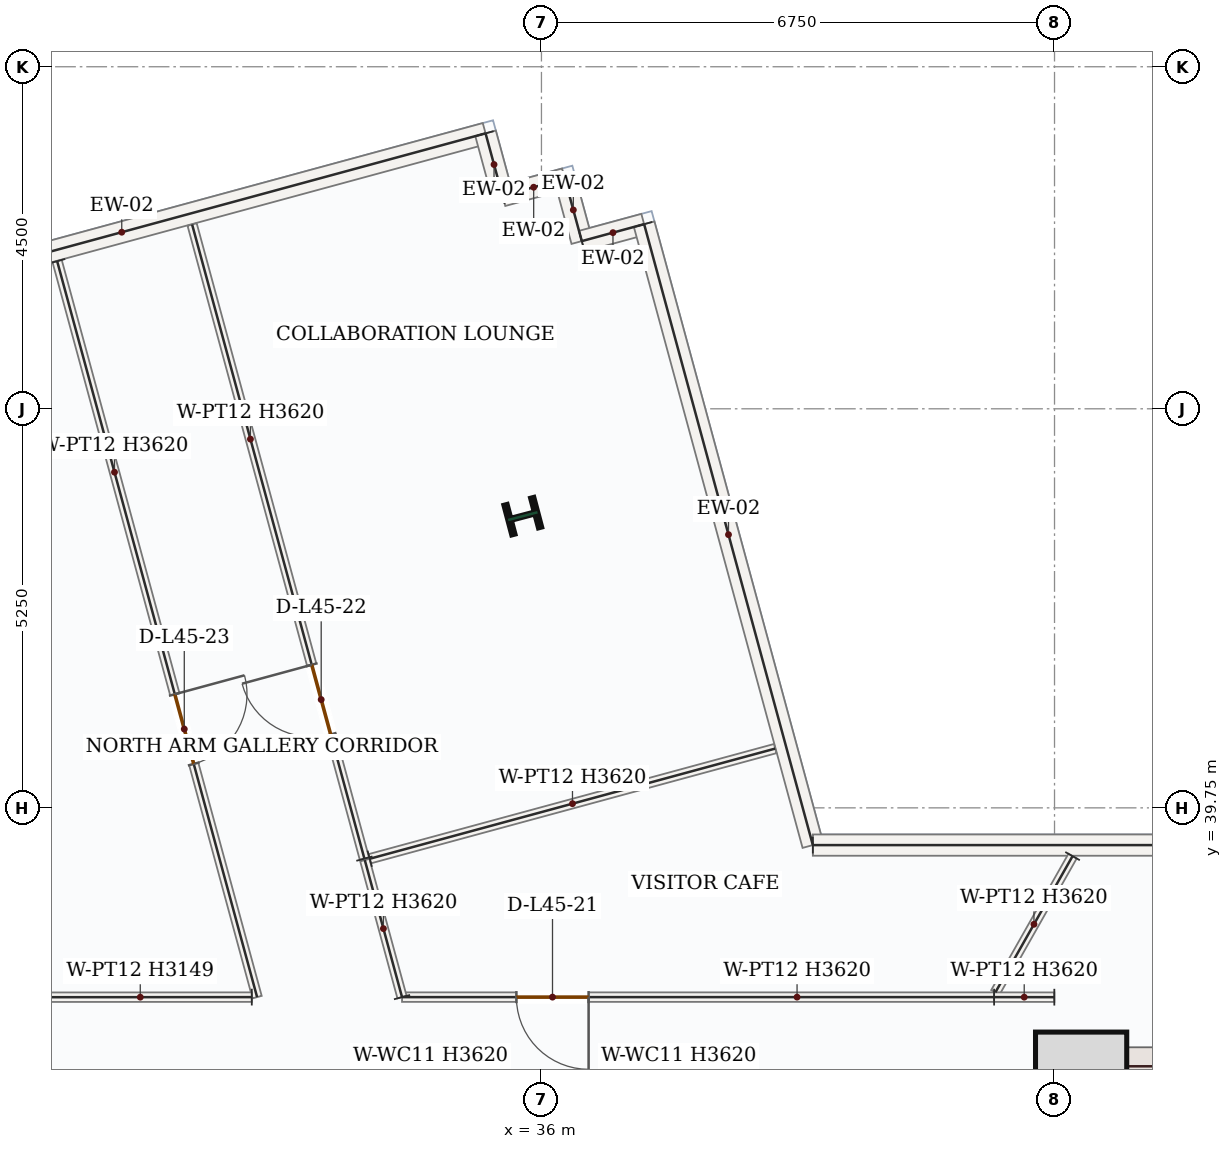
"""IFC4 building model, lengths in metres.
Left out: names, types, materials, properties, quantities, classifications, styles, units other than length and angle.
Written with IfcOpenShell. Run it as: python <this file> out.ifc"""

import sys

from ifc_helpers import new_model, si_unit, direction, frame, frame_2d, origin, origin_2d, place, context, subcontext, project, spatial, rectangle, i_section, extrude, source, transform, mapped, element, fill, save


model = new_model("IFC4")
c1 = context("Model", 3, precision=1e-05, world=origin(), true_north=direction((0.0, 1.0)))
c2 = subcontext(c1, "Body", "Model", "MODEL_VIEW")
j1 = project(units=[si_unit("LENGTHUNIT", "METRE"), si_unit("PLANEANGLEUNIT", "RADIAN")], contexts=[c1])
p1 = place(None, origin())
s1 = spatial("IfcSite", under=j1, at=p1, CompositionType="ELEMENT")
p2 = place(p1, origin())
s2 = spatial("IfcBuilding", under=s1, at=p2, CompositionType="ELEMENT")
p3 = place(p2, frame((0.0, 0.0, 194.1)))
s3 = spatial("IfcBuildingStorey", under=s2, at=p3, CompositionType="ELEMENT", Elevation=194.1)
p4 = place(p3, frame((43.0, 28.05, 0.0), z_axis=(0.0, 0.0, 1.0), x_axis=(0.0, 1.0, 0.0)))
e1 = element("IfcWall", 1, at=p4, inside=s3, PredefinedType="SHEAR", context=c2, shape_type="SweptSolid", body=[
    extrude(rectangle(XDim=8.55, YDim=0.5, at=frame_2d((4.275, 0.0))), origin(), (0.0, 0.0, 1.0), 3.62),
])
p5 = place(p4, frame((1.5, 0.0, 0.0)))
e2 = element("IfcOpeningElement", 2, at=p5, cuts=e1, PredefinedType="OPENING", context=c2, shape_type="SweptSolid", body=[
    extrude(rectangle(XDim=1.1, YDim=2.2, at=frame_2d((0.55, 1.1))), frame((0.0, 0.26, 0.0), z_axis=(0.0, -1.0, 0.0), x_axis=(1.0, 0.0, 0.0)), (0.0, 0.0, 1.0), 0.52),
])
m1 = source(origin(), c2, "Body", "SweptSolid", [
    extrude(rectangle(XDim=7.0, YDim=0.5, at=frame_2d((3.5, 0.0))), origin(), (0.0, 0.0, 1.0), 3.62),
])
p6 = place(p3, frame((43.25, 36.35, 0.0), z_axis=(0.0, 0.0, 1.0), x_axis=(1.0, 0.0, 0.0)))
e3 = element("IfcWall", 3, at=p6, inside=s3, PredefinedType="SHEAR", context=c2, shape_type="MappedRepresentation", body=[
    mapped(m1, transform((0.0, 0.0, 0.0), x_axis=(1.0, 0.0, 0.0), y_axis=(0.0, 1.0, 0.0), z_axis=(0.0, 0.0, 1.0), scale=1.0)),
])
m2 = source(origin(), c2, "Body", "SweptSolid", [
    extrude(rectangle(XDim=1.2, YDim=1.2, at=origin_2d()), origin(), (0.0, 0.0, 1.0), 3.9),
])
p7 = place(p3, frame((43.1, 36.2, 0.0), z_axis=(0.0, 0.0, 1.0), x_axis=(1.0, 0.0, 0.0)))
e4 = element("IfcColumn", 4, at=p7, inside=s3, PredefinedType="COLUMN", context=c2, shape_type="MappedRepresentation", body=[
    mapped(m2, transform((0.0, 0.0, 0.0), x_axis=(1.0, 0.0, 0.0), y_axis=(0.0, 1.0, 0.0), z_axis=(0.0, 0.0, 1.0), scale=1.0)),
])
m3 = source(origin(), c2, "Body", "SweptSolid", [
    extrude(i_section(OverallWidth=0.404, OverallDepth=0.407, WebThickness=0.027, FlangeThickness=0.044, FilletRadius=0.018, at=origin_2d()), origin(), (0.0, 0.0, 1.0), 3.9),
])
p8 = place(p3, frame((35.755, 43.588, 0.0), z_axis=(0.0, 0.0, 1.0), x_axis=(-0.255445757936, 0.966823388604, 0.0)))
e5 = element("IfcColumn", 5, at=p8, inside=s3, PredefinedType="COLUMN", context=c2, shape_type="MappedRepresentation", body=[
    mapped(m3, transform((0.0, 0.0, 0.0), x_axis=(1.0, 0.0, 0.0), y_axis=(0.0, 1.0, 0.0), z_axis=(0.0, 0.0, 1.0), scale=1.0)),
])
m4 = source(origin(), c2, "Body", "SweptSolid", [
    extrude(rectangle(XDim=9.92, YDim=0.28, at=frame_2d((4.96, 0.0))), origin(), (0.0, 0.0, 1.0), 3.62),
])
p9 = place(p3, frame((25.692, 46.023, 0.0), z_axis=(0.0, 0.0, 1.0), x_axis=(0.965012714082, 0.262203092393, 0.0)))
e6 = element("IfcWall", 6, at=p9, inside=s3, PredefinedType="SOLIDWALL", context=c2, shape_type="MappedRepresentation", body=[
    mapped(m4, transform((0.0, 0.0, 0.0), x_axis=(1.0, 0.0, 0.0), y_axis=(0.0, 1.0, 0.0), z_axis=(0.0, 0.0, 1.0), scale=1.0)),
])
m5 = source(origin(), c2, "Body", "SweptSolid", [
    extrude(rectangle(XDim=0.85, YDim=0.28, at=frame_2d((0.425, 0.0))), origin(), (0.0, 0.0, 1.0), 3.62),
])
for number, where, z_axis, x_axis in (
    (7, (35.265, 48.624, 0.0), (0.0, 0.0, 1.0), (0.262, -0.965, 0.0)),
    (8, (35.488, 47.803, 0.0), (0.0, 0.0, 1.0), (0.965, 0.262, 0.0)),
    (9, (36.308, 48.026, 0.0), (0.0, 0.0, 1.0), (0.262, -0.965, 0.0)),
    (10, (36.531, 47.206, 0.0), (0.0, 0.0, 1.0), (0.965, 0.262, 0.0)),
):
    element("IfcWall", number, at=place(p3, frame(where, z_axis=z_axis, x_axis=x_axis)), inside=s3, PredefinedType="SOLIDWALL", context=c2, shape_type="MappedRepresentation", body=[
        mapped(m5, transform((0.0, 0.0, 0.0), x_axis=(1.0, 0.0, 0.0), y_axis=(0.0, 1.0, 0.0), z_axis=(0.0, 0.0, 1.0), scale=1.0)),
    ])
m6 = source(origin(), c2, "Body", "SweptSolid", [
    extrude(rectangle(XDim=8.465, YDim=0.28, at=frame_2d((4.232, 0.0))), origin(), (0.0, 0.0, 1.0), 3.62),
])
p10 = place(p3, frame((37.351, 47.429, 0.0), z_axis=(0.0, 0.0, 1.0), x_axis=(0.262192380254, -0.965015624608, 0.0)))
e11 = element("IfcWall", 11, at=p10, inside=s3, PredefinedType="SOLIDWALL", context=c2, shape_type="MappedRepresentation", body=[
    mapped(m6, transform((0.0, 0.0, 0.0), x_axis=(1.0, 0.0, 0.0), y_axis=(0.0, 1.0, 0.0), z_axis=(0.0, 0.0, 1.0), scale=1.0)),
])
m7 = source(origin(), c2, "Body", "SweptSolid", [
    extrude(rectangle(XDim=9.771, YDim=0.28, at=frame_2d((4.886, 0.0))), origin(), (0.0, 0.0, 1.0), 3.62),
])
p11 = place(p3, frame((39.571, 39.26, 0.0), z_axis=(0.0, 0.0, 1.0), x_axis=(1.0, 0.0, 0.0)))
e12 = element("IfcWall", 12, at=p11, inside=s3, PredefinedType="SOLIDWALL", context=c2, shape_type="MappedRepresentation", body=[
    mapped(m7, transform((0.0, 0.0, 0.0), x_axis=(1.0, 0.0, 0.0), y_axis=(0.0, 1.0, 0.0), z_axis=(0.0, 0.0, 1.0), scale=1.0)),
])
p12 = place(p3, frame((41.955, 37.26, 0.0), z_axis=(0.0, 0.0, 1.0), x_axis=(-1.0, 0.0, 0.0)))
e13 = element("IfcWall", 13, at=p12, inside=s3, PredefinedType="PARTITIONING", context=c2, shape_type="SweptSolid", body=[
    extrude(rectangle(XDim=7.79, YDim=0.125, at=frame_2d((3.895, 0.0))), origin(), (0.0, 0.0, 1.0), 3.62),
])
p13 = place(p12, frame((5.335, 0.0, 0.0)))
e14 = element("IfcOpeningElement", 14, at=p13, cuts=e13, PredefinedType="OPENING", context=c2, shape_type="SweptSolid", body=[
    extrude(rectangle(XDim=0.95, YDim=2.15, at=frame_2d((0.475, 1.075))), frame((0.0, 0.073, 0.0), z_axis=(0.0, -1.0, 0.0), x_axis=(1.0, 0.0, 0.0)), (0.0, 0.0, 1.0), 0.145),
])
m8 = source(origin(), c2, "Body", "SweptSolid", [
    extrude(rectangle(XDim=1.868, YDim=0.125, at=frame_2d((0.934, 0.0))), origin(), (0.0, 0.0, 1.0), 3.62),
])
p14 = place(p3, frame((34.166, 37.26, 0.0), z_axis=(0.0, 0.0, 1.0), x_axis=(-0.262166249224, 0.965022723964, 0.0)))
e15 = element("IfcWall", 15, at=p14, inside=s3, PredefinedType="PARTITIONING", context=c2, shape_type="MappedRepresentation", body=[
    mapped(m8, transform((0.0, 0.0, 0.0), x_axis=(1.0, 0.0, 0.0), y_axis=(0.0, 1.0, 0.0), z_axis=(0.0, 0.0, 1.0), scale=1.0)),
])
m9 = source(origin(), c2, "Body", "SweptSolid", [
    extrude(rectangle(XDim=5.527, YDim=0.125, at=frame_2d((2.764, 0.0))), origin(), (0.0, 0.0, 1.0), 3.62),
])
p15 = place(p3, frame((33.741, 39.08, 0.0), z_axis=(0.0, 0.0, 1.0), x_axis=(0.965004985248, 0.262231535949, 0.0)))
e16 = element("IfcWall", 16, at=p15, inside=s3, PredefinedType="PARTITIONING", context=c2, shape_type="MappedRepresentation", body=[
    mapped(m9, transform((0.0, 0.0, 0.0), x_axis=(1.0, 0.0, 0.0), y_axis=(0.0, 1.0, 0.0), z_axis=(0.0, 0.0, 1.0), scale=1.0)),
])
m10 = source(origin(), c2, "Body", "SweptSolid", [
    extrude(rectangle(XDim=2.061, YDim=0.125, at=frame_2d((1.03, 0.0))), origin(), (0.0, 0.0, 1.0), 3.62),
])
p16 = place(p3, frame((42.987, 39.115, 0.0), z_axis=(0.0, 0.0, 1.0), x_axis=(-0.492818271576, -0.870132260752, 0.0)))
e17 = element("IfcWall", 17, at=p16, inside=s3, PredefinedType="PARTITIONING", context=c2, shape_type="MappedRepresentation", body=[
    mapped(m10, transform((0.0, 0.0, 0.0), x_axis=(1.0, 0.0, 0.0), y_axis=(0.0, 1.0, 0.0), z_axis=(0.0, 0.0, 1.0), scale=1.0)),
])
p17 = place(p3, frame((33.671, 39.082, 0.0), z_axis=(0.0, 0.0, 1.0), x_axis=(-0.262187726373, 0.965016889044, 0.0)))
e18 = element("IfcWall", 18, at=p17, inside=s3, PredefinedType="PARTITIONING", context=c2, shape_type="SweptSolid", body=[
    extrude(rectangle(XDim=8.645, YDim=0.125, at=frame_2d((4.323, 0.0))), origin(), (0.0, 0.0, 1.0), 3.62),
])
p18 = place(p17, frame((1.693, 0.0, 0.0)))
e19 = element("IfcOpeningElement", 19, at=p18, cuts=e18, PredefinedType="OPENING", context=c2, shape_type="SweptSolid", body=[
    extrude(rectangle(XDim=0.95, YDim=2.15, at=frame_2d((0.475, 1.075))), frame((0.0, 0.073, 0.0), z_axis=(0.0, -1.0, 0.0), x_axis=(1.0, 0.0, 0.0)), (0.0, 0.0, 1.0), 0.145),
])
p19 = place(p3, frame((29.628, 46.942, 0.0), z_axis=(0.0, 0.0, 1.0), x_axis=(0.262192801501, -0.965015510156, 0.0)))
e20 = element("IfcWall", 20, at=p19, inside=s3, PredefinedType="PARTITIONING", context=c2, shape_type="SweptSolid", body=[
    extrude(rectangle(XDim=10.033, YDim=0.125, at=frame_2d((5.017, 0.0))), origin(), (0.0, 0.0, 1.0), 3.62),
])
p20 = place(p19, frame((5.904, 0.0, 0.0)))
e21 = element("IfcOpeningElement", 21, at=p20, cuts=e20, PredefinedType="OPENING", context=c2, shape_type="SweptSolid", body=[
    extrude(rectangle(XDim=0.95, YDim=2.15, at=frame_2d((0.475, 1.075))), frame((0.0, 0.073, 0.0), z_axis=(0.0, -1.0, 0.0), x_axis=(1.0, 0.0, 0.0)), (0.0, 0.0, 1.0), 0.145),
])
m11 = source(origin(), c2, "Body", "SweptSolid", [
    extrude(rectangle(XDim=2.934, YDim=0.125, at=frame_2d((1.467, 0.0))), origin(), (0.0, 0.0, 1.0), 3.149),
])
p21 = place(p3, frame((32.189, 37.26, 0.0), z_axis=(0.0, 0.0, 1.0), x_axis=(-0.999999913469, -0.000416007951, 0.0)))
e22 = element("IfcWall", 22, at=p21, inside=s3, PredefinedType="PARTITIONING", context=c2, shape_type="MappedRepresentation", body=[
    mapped(m11, transform((0.0, 0.0, 0.0), x_axis=(1.0, 0.0, 0.0), y_axis=(0.0, 1.0, 0.0), z_axis=(0.0, 0.0, 1.0), scale=1.0)),
])
m12 = source(origin(), c2, "Body", "SweptSolid", [
    extrude(rectangle(XDim=0.792, YDim=0.125, at=frame_2d((0.396, 0.0))), origin(), (0.0, 0.0, 1.0), 3.62),
])
p22 = place(p3, frame((42.748, 37.259, 0.0), z_axis=(0.0, 0.0, 1.0), x_axis=(-0.999999572651, 0.000924498835, 0.0)))
e23 = element("IfcWall", 23, at=p22, inside=s3, PredefinedType="PARTITIONING", context=c2, shape_type="MappedRepresentation", body=[
    mapped(m12, transform((0.0, 0.0, 0.0), x_axis=(1.0, 0.0, 0.0), y_axis=(0.0, 1.0, 0.0), z_axis=(0.0, 0.0, 1.0), scale=1.0)),
])
m13 = source(origin(), c2, "Body", "SweptSolid", [
    extrude(rectangle(XDim=0.95, YDim=2.15, at=frame_2d((0.475, 1.075))), frame((0.0, 0.025, 0.0), z_axis=(0.0, -1.0, 0.0), x_axis=(1.0, 0.0, 0.0)), (0.0, 0.0, 1.0), 0.05),
])
p23 = place(p13, origin())
e24 = element("IfcDoor", 24, at=p23, inside=s3, OperationType="SINGLE_SWING_LEFT", PredefinedType="DOOR", context=c2, shape_type="MappedRepresentation", body=[
    mapped(m13, transform((0.0, 0.0, 0.0), x_axis=(1.0, 0.0, 0.0), y_axis=(0.0, 1.0, 0.0), z_axis=(0.0, 0.0, 1.0), scale=1.0)),
])
fill(e14, e24)
p24 = place(p18, origin())
e25 = element("IfcDoor", 25, at=p24, inside=s3, OperationType="SINGLE_SWING_RIGHT", PredefinedType="DOOR", context=c2, shape_type="MappedRepresentation", body=[
    mapped(m13, transform((0.0, 0.0, 0.0), x_axis=(1.0, 0.0, 0.0), y_axis=(0.0, 1.0, 0.0), z_axis=(0.0, 0.0, 1.0), scale=1.0)),
])
fill(e19, e25)
p25 = place(p20, origin())
e26 = element("IfcDoor", 26, at=p25, inside=s3, OperationType="SINGLE_SWING_LEFT", PredefinedType="DOOR", context=c2, shape_type="MappedRepresentation", body=[
    mapped(m13, transform((0.0, 0.0, 0.0), x_axis=(1.0, 0.0, 0.0), y_axis=(0.0, 1.0, 0.0), z_axis=(0.0, 0.0, 1.0), scale=1.0)),
])
fill(e21, e26)
save(model, sys.argv[1])
